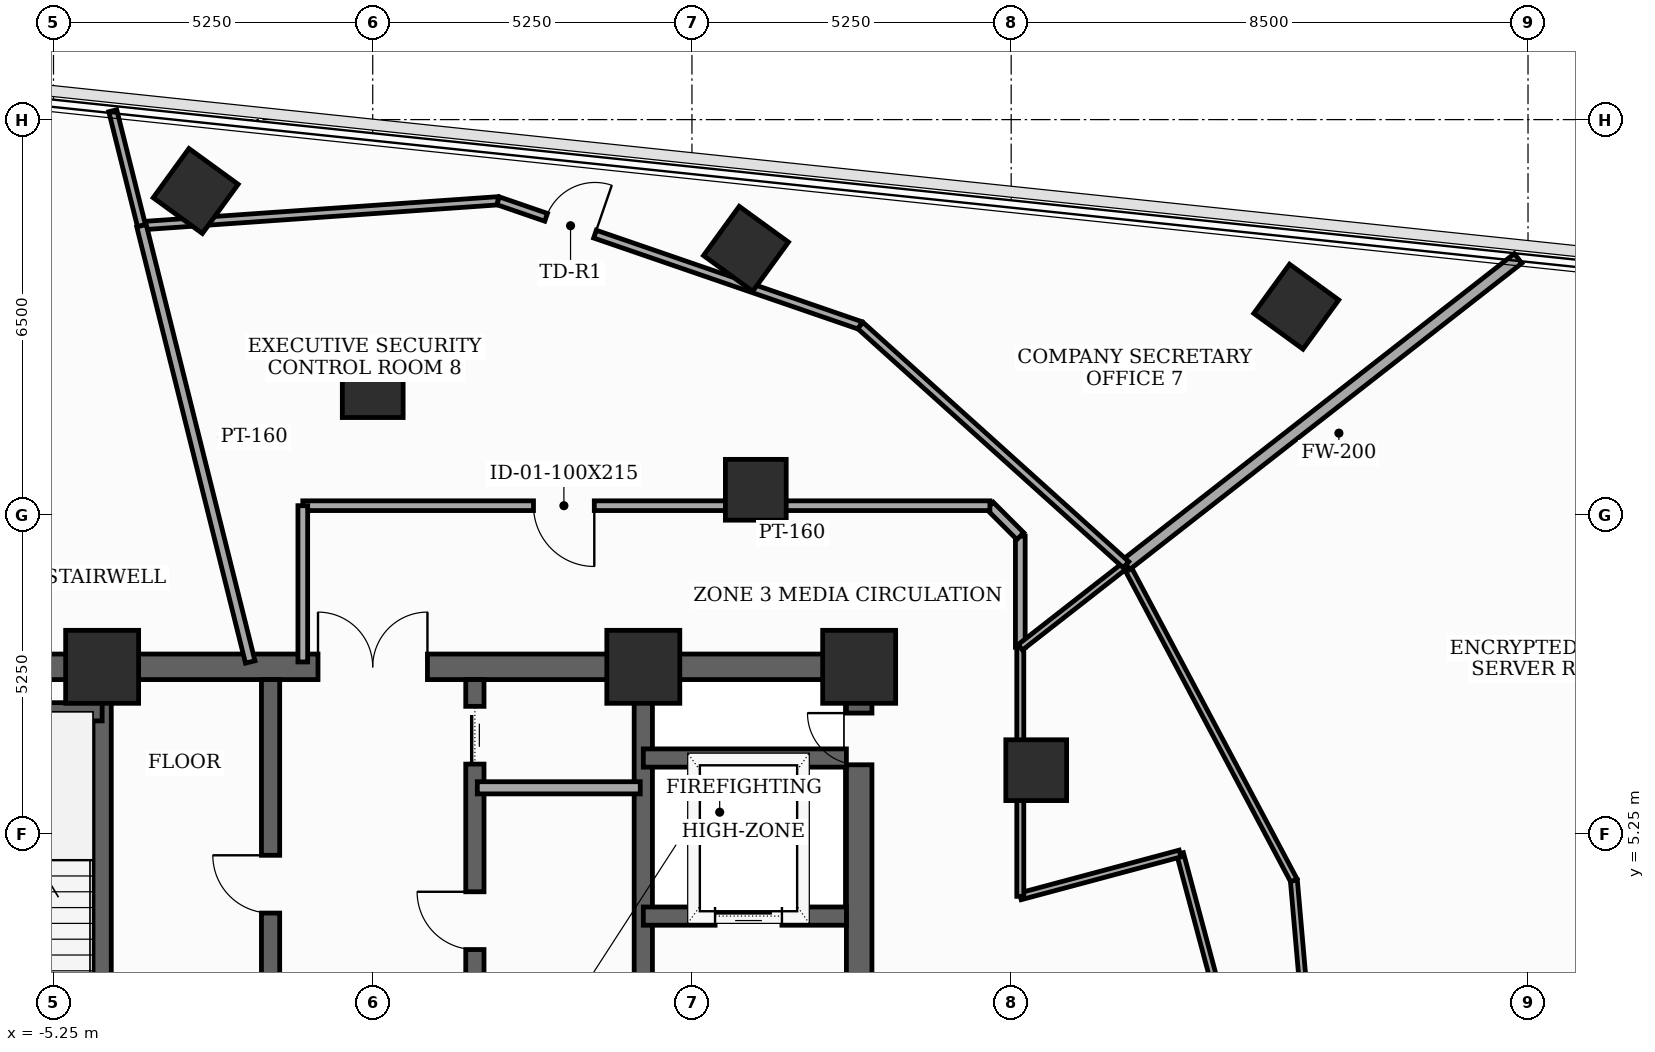
"""IFC4 building model, lengths in metres.
Left out: names, types, materials, properties, quantities, classifications, styles, units other than length and angle.
Written with IfcOpenShell. Run it as: python <this file> out.ifc"""

import sys

from ifc_helpers import new_model, si_unit, direction, frame, frame_2d, origin, origin_2d, place, context, subcontext, project, spatial, rectangle, extrude, element, fill, save


model = new_model("IFC4")
c1 = context("Model", 3, precision=1e-05, world=origin(), true_north=direction((0.0, 1.0)))
c2 = subcontext(c1, "Body", "Model", "MODEL_VIEW")
j1 = project(units=[si_unit("LENGTHUNIT", "METRE"), si_unit("PLANEANGLEUNIT", "RADIAN")], contexts=[c1])
p1 = place(None, origin())
s1 = spatial("IfcSite", under=j1, at=p1, CompositionType="ELEMENT")
p2 = place(p1, origin())
s2 = spatial("IfcBuilding", under=s1, at=p2, CompositionType="ELEMENT")
p3 = place(p2, frame((0.0, 0.0, 218.9)))
s3 = spatial("IfcBuildingStorey", under=s2, at=p3, CompositionType="ELEMENT", Elevation=218.9)
for number, where, z_axis, x_axis in (
    (1, (8.0, 8.0, 0.0), (0.0, 0.0, 1.0), (1.0, 0.0, 0.0)),
    (2, (4.45, 8.0, 0.0), (0.0, 0.0, 1.0), (1.0, 0.0, 0.0)),
    (3, (-4.45, 8.0, 0.0), (0.0, 0.0, 1.0), (1.0, 0.0, 0.0)),
):
    element("IfcColumn", number, at=place(p3, frame(where, z_axis=z_axis, x_axis=x_axis)), inside=s3, PredefinedType="COLUMN", context=c2, shape_type="SweptSolid", body=[
        extrude(rectangle(XDim=1.2, YDim=1.2, at=origin_2d()), origin(), (0.0, 0.0, 1.0), 3.7),
    ])
for number, where, z_axis, x_axis in (
    (4, (10.912, 6.3, 0.0), (0.0, 0.0, 1.0), (1.0, 0.0, 0.0)),
    (5, (6.3, 10.912, 0.0), (0.0, 0.0, 1.0), (1.0, 0.0, 0.0)),
    (6, (0.0, 12.6, 0.0), (0.0, 0.0, 1.0), (1.0, 0.0, 0.0)),
    (7, (15.188, 13.923, 0.0), (0.0, 0.0, 1.0), (0.588, 0.809, 0.0)),
    (8, (6.138, 14.875, 0.0), (0.0, 0.0, 1.0), (0.588, 0.809, 0.0)),
    (9, (-2.912, 15.826, 0.0), (0.0, 0.0, 1.0), (0.588, 0.809, 0.0)),
):
    element("IfcColumn", number, at=place(p3, frame(where, z_axis=z_axis, x_axis=x_axis)), inside=s3, PredefinedType="COLUMN", context=c2, shape_type="SweptSolid", body=[
        extrude(rectangle(XDim=1.0, YDim=1.0, at=origin_2d()), origin(), (0.0, 0.0, 1.0), 3.7),
    ])
p4 = place(p3, frame((8.0, -8.0, 0.0), z_axis=(0.0, 0.0, 1.0), x_axis=(0.0, 1.0, 0.0)))
e10 = element("IfcWall", 10, at=p4, inside=s3, PredefinedType="SHEAR", context=c2, shape_type="SweptSolid", body=[
    extrude(rectangle(XDim=16.0, YDim=0.42, at=frame_2d((8.0, 0.0))), origin(), (0.0, 0.0, 1.0), 3.5),
])
p5 = place(p4, frame((9.6, 0.0, 0.0)))
e11 = element("IfcOpeningElement", 11, at=p5, cuts=e10, PredefinedType="OPENING", context=c2, shape_type="SweptSolid", body=[
    extrude(rectangle(XDim=1.05, YDim=2.15, at=frame_2d((0.525, 1.075))), frame((0.0, 0.22, 0.0), z_axis=(0.0, -1.0, 0.0), x_axis=(1.0, 0.0, 0.0)), (0.0, 0.0, 1.0), 0.44),
])
p6 = place(p4, frame((14.389, 0.0, 0.0)))
e12 = element("IfcOpeningElement", 12, at=p6, cuts=e10, PredefinedType="OPENING", context=c2, shape_type="SweptSolid", body=[
    extrude(rectangle(XDim=0.85, YDim=2.02, at=frame_2d((0.425, 1.01))), frame((0.0, 0.22, 0.0), z_axis=(0.0, -1.0, 0.0), x_axis=(1.0, 0.0, 0.0)), (0.0, 0.0, 1.0), 0.44),
])
p7 = place(p3, frame((-8.0, 8.0, 0.0), z_axis=(0.0, 0.0, 1.0), x_axis=(1.0, 0.0, 0.0)))
e13 = element("IfcWall", 13, at=p7, inside=s3, PredefinedType="SHEAR", context=c2, shape_type="SweptSolid", body=[
    extrude(rectangle(XDim=16.0, YDim=0.42, at=frame_2d((8.0, 0.0))), origin(), (0.0, 0.0, 1.0), 3.5),
])
p8 = place(p7, frame((7.1, 0.0, 0.0)))
e14 = element("IfcOpeningElement", 14, at=p8, cuts=e13, PredefinedType="OPENING", context=c2, shape_type="SweptSolid", body=[
    extrude(rectangle(XDim=1.8, YDim=2.15, at=frame_2d((0.9, 1.075))), frame((0.0, 0.22, 0.0), z_axis=(0.0, -1.0, 0.0), x_axis=(1.0, 0.0, 0.0)), (0.0, 0.0, 1.0), 0.44),
])
for number, where, z_axis, x_axis in (
    (15, (-4.45, -7.79, 0.0), (0.0, 0.0, 1.0), (0.0, 1.0, 0.0)),
    (16, (4.45, -7.79, 0.0), (0.0, 0.0, 1.0), (0.0, 1.0, 0.0)),
):
    element("IfcWall", number, at=place(p3, frame(where, z_axis=z_axis, x_axis=x_axis)), inside=s3, PredefinedType="SHEAR", context=c2, shape_type="SweptSolid", body=[
        extrude(rectangle(XDim=15.58, YDim=0.3, at=frame_2d((7.79, 0.0))), origin(), (0.0, 0.0, 1.0), 3.5),
    ])
p9 = place(p3, frame((-7.79, 7.26, 0.0), z_axis=(0.0, 0.0, 1.0), x_axis=(1.0, 0.0, 0.0)))
e17 = element("IfcWall", 17, at=p9, inside=s3, PredefinedType="SHEAR", context=c2, shape_type="SweptSolid", body=[
    extrude(rectangle(XDim=3.34, YDim=0.3, at=frame_2d((1.67, 0.0))), origin(), (0.0, 0.0, 1.0), 3.5),
])
p10 = place(p3, frame((4.45, 3.9, 0.0), z_axis=(0.0, 0.0, 1.0), x_axis=(1.0, 0.0, 0.0)))
e18 = element("IfcWall", 18, at=p10, inside=s3, PredefinedType="SHEAR", context=c2, shape_type="SweptSolid", body=[
    extrude(rectangle(XDim=3.34, YDim=0.3, at=frame_2d((1.67, 0.0))), origin(), (0.0, 0.0, 1.0), 3.5),
])
p11 = place(p10, frame((1.18, 0.0, 0.0)))
e19 = element("IfcOpeningElement", 19, at=p11, cuts=e18, PredefinedType="OPENING", context=c2, shape_type="SweptSolid", body=[
    extrude(rectangle(XDim=1.1, YDim=2.1, at=frame_2d((0.55, 1.05))), frame((0.0, 0.16, 0.0), z_axis=(0.0, -1.0, 0.0), x_axis=(1.0, 0.0, 0.0)), (0.0, 0.0, 1.0), 0.32),
])
p12 = place(p3, frame((4.45, 6.5, 0.0), z_axis=(0.0, 0.0, 1.0), x_axis=(1.0, 0.0, 0.0)))
e20 = element("IfcWall", 20, at=p12, inside=s3, PredefinedType="SHEAR", context=c2, shape_type="SweptSolid", body=[
    extrude(rectangle(XDim=3.34, YDim=0.3, at=frame_2d((1.67, 0.0))), origin(), (0.0, 0.0, 1.0), 3.5),
])
p13 = place(p3, frame((-1.68, -4.85, 0.0), z_axis=(0.0, 0.0, 1.0), x_axis=(0.0, 1.0, 0.0)))
e21 = element("IfcWall", 21, at=p13, inside=s3, PredefinedType="SHEAR", context=c2, shape_type="SweptSolid", body=[
    extrude(rectangle(XDim=12.64, YDim=0.3, at=frame_2d((6.32, 0.0))), origin(), (0.0, 0.0, 1.0), 3.5),
])
p14 = place(p13, frame((2.6, 0.0, 0.0)))
e22 = element("IfcOpeningElement", 22, at=p14, cuts=e21, PredefinedType="OPENING", context=c2, shape_type="SweptSolid", body=[
    extrude(rectangle(XDim=0.95, YDim=2.1, at=frame_2d((0.475, 1.05))), frame((0.0, 0.16, 0.0), z_axis=(0.0, -1.0, 0.0), x_axis=(1.0, 0.0, 0.0)), (0.0, 0.0, 1.0), 0.32),
])
p15 = place(p13, frame((8.8, 0.0, 0.0)))
e23 = element("IfcOpeningElement", 23, at=p15, cuts=e21, PredefinedType="OPENING", context=c2, shape_type="SweptSolid", body=[
    extrude(rectangle(XDim=0.95, YDim=2.1, at=frame_2d((0.475, 1.05))), frame((0.0, 0.16, 0.0), z_axis=(0.0, -1.0, 0.0), x_axis=(1.0, 0.0, 0.0)), (0.0, 0.0, 1.0), 0.32),
])
p16 = place(p3, frame((1.68, -4.85, 0.0), z_axis=(0.0, 0.0, 1.0), x_axis=(0.0, 1.0, 0.0)))
e24 = element("IfcWall", 24, at=p16, inside=s3, PredefinedType="SHEAR", context=c2, shape_type="SweptSolid", body=[
    extrude(rectangle(XDim=12.64, YDim=0.3, at=frame_2d((6.32, 0.0))), origin(), (0.0, 0.0, 1.0), 3.5),
])
p17 = place(p16, frame((0.55, 0.0, 0.0)))
e25 = element("IfcOpeningElement", 25, at=p17, cuts=e24, PredefinedType="OPENING", context=c2, shape_type="SweptSolid", body=[
    extrude(rectangle(XDim=1.1, YDim=2.1, at=frame_2d((0.55, 1.05))), frame((0.0, 0.16, 0.0), z_axis=(0.0, -1.0, 0.0), x_axis=(1.0, 0.0, 0.0)), (0.0, 0.0, 1.0), 0.32),
])
p18 = place(p16, frame((2.65, 0.0, 0.0)))
e26 = element("IfcOpeningElement", 26, at=p18, cuts=e24, PredefinedType="OPENING", context=c2, shape_type="SweptSolid", body=[
    extrude(rectangle(XDim=1.1, YDim=2.1, at=frame_2d((0.55, 1.05))), frame((0.0, 0.16, 0.0), z_axis=(0.0, -1.0, 0.0), x_axis=(1.0, 0.0, 0.0)), (0.0, 0.0, 1.0), 0.32),
])
p19 = place(p16, frame((4.75, 0.0, 0.0)))
e27 = element("IfcOpeningElement", 27, at=p19, cuts=e24, PredefinedType="OPENING", context=c2, shape_type="SweptSolid", body=[
    extrude(rectangle(XDim=1.1, YDim=2.1, at=frame_2d((0.55, 1.05))), frame((0.0, 0.16, 0.0), z_axis=(0.0, -1.0, 0.0), x_axis=(1.0, 0.0, 0.0)), (0.0, 0.0, 1.0), 0.32),
])
p20 = place(p16, frame((8.2, 0.0, 0.0)))
e28 = element("IfcOpeningElement", 28, at=p20, cuts=e24, PredefinedType="OPENING", context=c2, shape_type="SweptSolid", body=[
    extrude(rectangle(XDim=0.95, YDim=2.1, at=frame_2d((0.475, 1.05))), frame((0.0, 0.16, 0.0), z_axis=(0.0, -1.0, 0.0), x_axis=(1.0, 0.0, 0.0)), (0.0, 0.0, 1.0), 0.32),
])
p21 = place(p16, frame((11.25, 0.0, 0.0)))
e29 = element("IfcOpeningElement", 29, at=p21, cuts=e24, PredefinedType="OPENING", context=c2, shape_type="SweptSolid", body=[
    extrude(rectangle(XDim=0.95, YDim=2.1, at=frame_2d((0.475, 1.05))), frame((0.0, 0.16, 0.0), z_axis=(0.0, -1.0, 0.0), x_axis=(1.0, 0.0, 0.0)), (0.0, 0.0, 1.0), 0.32),
])
p22 = place(p3, frame((1.72, 6.01, 0.0), z_axis=(0.0, 0.0, 1.0), x_axis=(1.0, 0.0, 0.0)))
e30 = element("IfcWall", 30, at=p22, inside=s3, PredefinedType="SOLIDWALL", context=c2, shape_type="SweptSolid", body=[
    extrude(rectangle(XDim=2.68, YDim=0.2, at=frame_2d((1.34, 0.0))), origin(), (0.0, 0.0, 1.0), 3.5),
])
p23 = place(p3, frame((13.962, 2.369, 0.0), z_axis=(0.0, 0.0, 1.0), x_axis=(-0.258413725385, 0.966034340245, 0.0)))
e31 = element("IfcWall", 31, at=p23, inside=s3, PredefinedType="PARTITIONING", context=c2, shape_type="SweptSolid", body=[
    extrude(rectangle(XDim=2.65, YDim=0.115, at=frame_2d((1.325, 0.0))), origin(), (0.0, 0.0, 1.0), 3.5),
])
p24 = place(p3, frame((13.277, 4.929, 0.0), z_axis=(0.0, 0.0, 1.0), x_axis=(-0.965934830229, -0.258785439601, 0.0)))
e32 = element("IfcWall", 32, at=p24, inside=s3, PredefinedType="PARTITIONING", context=c2, shape_type="SweptSolid", body=[
    extrude(rectangle(XDim=2.72, YDim=0.115, at=frame_2d((1.36, 0.0))), origin(), (0.0, 0.0, 1.0), 2.885),
])
p25 = place(p3, frame((10.65, 4.225, 0.0), z_axis=(0.0, 0.0, 1.0), x_axis=(0.0, 1.0, 0.0)))
e33 = element("IfcWall", 33, at=p25, inside=s3, PredefinedType="PARTITIONING", context=c2, shape_type="SweptSolid", body=[
    extrude(rectangle(XDim=4.096, YDim=0.115, at=frame_2d((2.048, 0.0))), origin(), (0.0, 0.0, 1.0), 2.885),
])
p26 = place(p3, frame((10.65, 8.321, 0.0), z_axis=(0.0, 0.0, 1.0), x_axis=(0.0, 1.0, 0.0)))
e34 = element("IfcWall", 34, at=p26, inside=s3, PredefinedType="PARTITIONING", context=c2, shape_type="SweptSolid", body=[
    extrude(rectangle(XDim=1.829, YDim=0.16, at=frame_2d((0.915, 0.0))), origin(), (0.0, 0.0, 1.0), 3.5),
])
p27 = place(p3, frame((10.65, 10.15, 0.0), z_axis=(0.0, 0.0, 1.0), x_axis=(-0.707106781187, 0.707106781187, 0.0)))
e35 = element("IfcWall", 35, at=p27, inside=s3, PredefinedType="PARTITIONING", context=c2, shape_type="SweptSolid", body=[
    extrude(rectangle(XDim=0.707, YDim=0.16, at=frame_2d((0.354, 0.0))), origin(), (0.0, 0.0, 1.0), 3.5),
])
p28 = place(p3, frame((10.15, 10.65, 0.0), z_axis=(0.0, 0.0, 1.0), x_axis=(-1.0, 0.0, 0.0)))
e36 = element("IfcWall", 36, at=p28, inside=s3, PredefinedType="PARTITIONING", context=c2, shape_type="SweptSolid", body=[
    extrude(rectangle(XDim=11.3, YDim=0.16, at=frame_2d((5.65, 0.0))), origin(), (0.0, 0.0, 1.0), 2.885),
])
p29 = place(p28, frame((6.506, 0.0, 0.0)))
e37 = element("IfcOpeningElement", 37, at=p29, cuts=e36, PredefinedType="OPENING", context=c2, shape_type="SweptSolid", body=[
    extrude(rectangle(XDim=1.0, YDim=2.15, at=frame_2d((0.5, 1.075))), frame((0.0, 0.09, 0.0), z_axis=(0.0, -1.0, 0.0), x_axis=(1.0, 0.0, 0.0)), (0.0, 0.0, 1.0), 0.18),
])
p30 = place(p3, frame((-1.15, 10.65, 0.0), z_axis=(0.0, 0.0, 1.0), x_axis=(0.0, -1.0, 0.0)))
e38 = element("IfcWall", 38, at=p30, inside=s3, PredefinedType="PARTITIONING", context=c2, shape_type="SweptSolid", body=[
    extrude(rectangle(XDim=2.57, YDim=0.16, at=frame_2d((1.285, 0.0))), origin(), (0.0, 0.0, 1.0), 2.885),
])
p31 = place(p3, frame((15.698, -1.789, 0.0), z_axis=(0.0, 0.0, 1.0), x_axis=(-0.087153009445, 0.996194937221, 0.0)))
e39 = element("IfcWall", 39, at=p31, inside=s3, PredefinedType="PARTITIONING", context=c2, shape_type="SweptSolid", body=[
    extrude(rectangle(XDim=6.3, YDim=0.115, at=frame_2d((3.15, 0.0))), origin(), (0.0, 0.0, 1.0), 2.985),
])
p32 = place(p31, frame((2.69, 0.0, 0.0)))
e40 = element("IfcOpeningElement", 40, at=p32, cuts=e39, PredefinedType="OPENING", context=c2, shape_type="SweptSolid", body=[
    extrude(rectangle(XDim=0.92, YDim=2.1, at=frame_2d((0.46, 1.05))), frame((0.0, 0.067, 0.0), z_axis=(0.0, -1.0, 0.0), x_axis=(1.0, 0.0, 0.0)), (0.0, 0.0, 1.0), 0.135),
])
p33 = place(p3, frame((15.149, 4.487, 0.0), z_axis=(0.0, 0.0, 1.0), x_axis=(-0.469396049876, 0.882987739643, 0.0)))
e41 = element("IfcWall", 41, at=p33, inside=s3, PredefinedType="PARTITIONING", context=c2, shape_type="SweptSolid", body=[
    extrude(rectangle(XDim=5.88, YDim=0.115, at=frame_2d((2.94, 0.0))), origin(), (0.0, 0.0, 1.0), 2.985),
])
p34 = place(p3, frame((12.389, 9.679, 0.0), z_axis=(0.0, 0.0, 1.0), x_axis=(-0.788177008199, -0.615448619908, 0.0)))
e42 = element("IfcWall", 42, at=p34, inside=s3, PredefinedType="PARTITIONING", context=c2, shape_type="SweptSolid", body=[
    extrude(rectangle(XDim=2.206, YDim=0.115, at=frame_2d((1.103, 0.0))), origin(), (0.0, 0.0, 1.0), 3.5),
])
p35 = place(p3, frame((18.836, 14.716, 0.0), z_axis=(0.0, 0.0, 1.0), x_axis=(-0.78799903942, -0.615676468507, 0.0)))
e43 = element("IfcWall", 43, at=p35, inside=s3, PredefinedType="SOLIDWALL", context=c2, shape_type="SweptSolid", body=[
    extrude(rectangle(XDim=8.182, YDim=0.2, at=frame_2d((4.091, 0.0))), origin(), (0.0, 0.0, 1.0), 2.985),
])
p36 = place(p3, frame((-3.803, 15.255, 0.0), z_axis=(0.0, 0.0, 1.0), x_axis=(0.997563622011, 0.069762597718, 0.0)))
e44 = element("IfcWall", 44, at=p36, inside=s3, PredefinedType="PARTITIONING", context=c2, shape_type="SweptSolid", body=[
    extrude(rectangle(XDim=5.879, YDim=0.135, at=frame_2d((2.94, 0.0))), origin(), (0.0, 0.0, 1.0), 2.985),
])
p37 = place(p3, frame((2.062, 15.665, 0.0), z_axis=(0.0, 0.0, 1.0), x_axis=(0.94552565825, -0.32554758422, 0.0)))
e45 = element("IfcWall", 45, at=p37, inside=s3, PredefinedType="PARTITIONING", context=c2, shape_type="SweptSolid", body=[
    extrude(rectangle(XDim=6.3, YDim=0.135, at=frame_2d((3.15, 0.0))), origin(), (0.0, 0.0, 1.0), 2.985),
])
p38 = place(p37, frame((0.835, 0.0, 0.0)))
e46 = element("IfcOpeningElement", 46, at=p38, cuts=e45, PredefinedType="OPENING", context=c2, shape_type="SweptSolid", body=[
    extrude(rectangle(XDim=0.85, YDim=2.02, at=frame_2d((0.425, 1.01))), frame((0.0, 0.077, 0.0), z_axis=(0.0, -1.0, 0.0), x_axis=(1.0, 0.0, 0.0)), (0.0, 0.0, 1.0), 0.155),
])
p39 = place(p3, frame((8.019, 13.614, 0.0), z_axis=(0.0, 0.0, 1.0), x_axis=(0.743110388877, -0.669168850099, 0.0)))
e47 = element("IfcWall", 47, at=p39, inside=s3, PredefinedType="PARTITIONING", context=c2, shape_type="SweptSolid", body=[
    extrude(rectangle(XDim=5.881, YDim=0.135, at=frame_2d((2.94, 0.0))), origin(), (0.0, 0.0, 1.0), 3.5),
])
p40 = place(p3, frame((-4.275, 17.146, 0.0), z_axis=(0.0, 0.0, 1.0), x_axis=(0.242417712213, -0.970171970738, 0.0)))
e48 = element("IfcWall", 48, at=p40, inside=s3, PredefinedType="PARTITIONING", context=c2, shape_type="SweptSolid", body=[
    extrude(rectangle(XDim=1.949, YDim=0.135, at=frame_2d((0.974, 0.0))), origin(), (0.0, 0.0, 1.0), 3.035),
])
p41 = place(p3, frame((-3.803, 15.255, 0.0), z_axis=(0.0, 0.0, 1.0), x_axis=(0.241851911951, -0.970313172479, 0.0)))
e49 = element("IfcWall", 49, at=p41, inside=s3, PredefinedType="PARTITIONING", context=c2, shape_type="SweptSolid", body=[
    extrude(rectangle(XDim=7.394, YDim=0.16, at=frame_2d((3.697, 0.0))), origin(), (0.0, 0.0, 1.0), 2.885),
])
p42 = place(p6, origin())
e50 = element("IfcDoor", 50, at=p42, inside=s3, OperationType="SINGLE_SWING_RIGHT", PredefinedType="TRAPDOOR", context=c2, shape_type="SweptSolid", body=[
    extrude(rectangle(XDim=0.85, YDim=2.02, at=frame_2d((0.425, 1.01))), frame((0.0, 0.025, 0.0), z_axis=(0.0, -1.0, 0.0), x_axis=(1.0, 0.0, 0.0)), (0.0, 0.0, 1.0), 0.05),
])
fill(e12, e50)
p43 = place(p8, origin())
e51 = element("IfcDoor", 51, at=p43, inside=s3, OperationType="DOUBLE_DOOR_SINGLE_SWING", PredefinedType="DOOR", context=c2, shape_type="SweptSolid", body=[
    extrude(rectangle(XDim=1.8, YDim=2.15, at=frame_2d((0.9, 1.075))), frame((0.0, 0.025, 0.0), z_axis=(0.0, -1.0, 0.0), x_axis=(1.0, 0.0, 0.0)), (0.0, 0.0, 1.0), 0.05),
])
fill(e14, e51)
p44 = place(p11, origin())
e52 = element("IfcDoor", 52, at=p44, inside=s3, OperationType="SLIDING_TO_LEFT", PredefinedType="DOOR", context=c2, shape_type="SweptSolid", body=[
    extrude(rectangle(XDim=1.1, YDim=2.1, at=frame_2d((0.55, 1.05))), frame((0.0, 0.025, 0.0), z_axis=(0.0, -1.0, 0.0), x_axis=(1.0, 0.0, 0.0)), (0.0, 0.0, 1.0), 0.05),
])
fill(e19, e52)
p45 = place(p15, origin())
e53 = element("IfcDoor", 53, at=p45, inside=s3, OperationType="SINGLE_SWING_RIGHT", PredefinedType="DOOR", context=c2, shape_type="SweptSolid", body=[
    extrude(rectangle(XDim=0.95, YDim=2.1, at=frame_2d((0.475, 1.05))), frame((0.0, 0.025, 0.0), z_axis=(0.0, -1.0, 0.0), x_axis=(1.0, 0.0, 0.0)), (0.0, 0.0, 1.0), 0.05),
])
fill(e23, e53)
p46 = place(p20, origin())
e54 = element("IfcDoor", 54, at=p46, inside=s3, OperationType="SINGLE_SWING_RIGHT", PredefinedType="DOOR", context=c2, shape_type="SweptSolid", body=[
    extrude(rectangle(XDim=0.95, YDim=2.1, at=frame_2d((0.475, 1.05))), frame((0.0, 0.025, 0.0), z_axis=(0.0, -1.0, 0.0), x_axis=(1.0, 0.0, 0.0)), (0.0, 0.0, 1.0), 0.05),
])
fill(e28, e54)
p47 = place(p21, origin())
e55 = element("IfcDoor", 55, at=p47, inside=s3, OperationType="SLIDING_TO_LEFT", PredefinedType="DOOR", context=c2, shape_type="SweptSolid", body=[
    extrude(rectangle(XDim=0.95, YDim=2.1, at=frame_2d((0.475, 1.05))), frame((0.0, 0.025, 0.0), z_axis=(0.0, -1.0, 0.0), x_axis=(1.0, 0.0, 0.0)), (0.0, 0.0, 1.0), 0.05),
])
fill(e29, e55)
p48 = place(p29, origin())
e56 = element("IfcDoor", 56, at=p48, inside=s3, OperationType="SINGLE_SWING_LEFT", PredefinedType="DOOR", context=c2, shape_type="SweptSolid", body=[
    extrude(rectangle(XDim=1.0, YDim=2.15, at=frame_2d((0.5, 1.075))), frame((0.0, 0.025, 0.0), z_axis=(0.0, -1.0, 0.0), x_axis=(1.0, 0.0, 0.0)), (0.0, 0.0, 1.0), 0.05),
])
fill(e37, e56)
p49 = place(p38, origin())
e57 = element("IfcDoor", 57, at=p49, inside=s3, OperationType="SINGLE_SWING_RIGHT", PredefinedType="TRAPDOOR", context=c2, shape_type="SweptSolid", body=[
    extrude(rectangle(XDim=0.85, YDim=2.02, at=frame_2d((0.425, 1.01))), frame((0.0, 0.025, 0.0), z_axis=(0.0, -1.0, 0.0), x_axis=(1.0, 0.0, 0.0)), (0.0, 0.0, 1.0), 0.05),
])
fill(e46, e57)
save(model, sys.argv[1])
